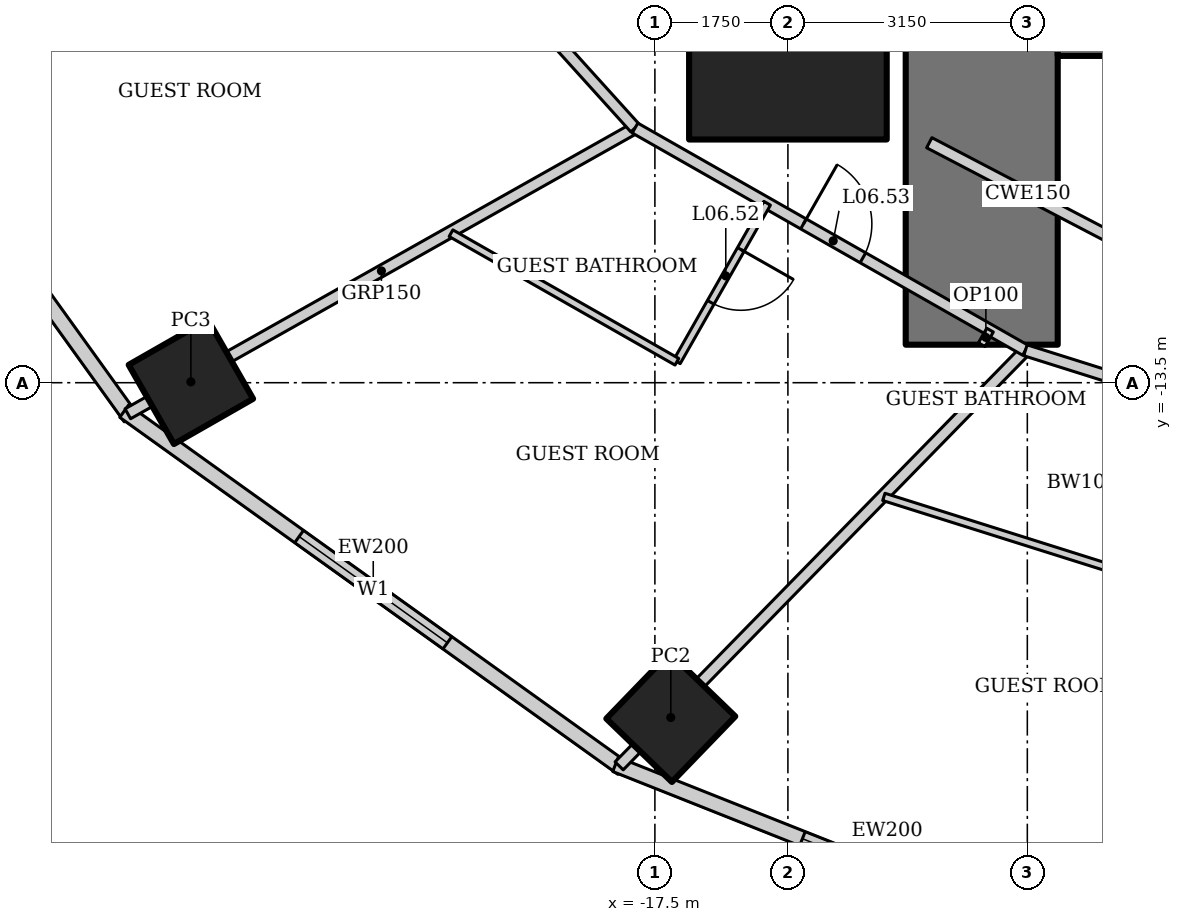
"""IFC4 building model, lengths in metres.
Left out: names, types, materials, properties, quantities, classifications, styles, units other than length and angle.
Written with IfcOpenShell. Run it as: python <this file> out.ifc"""

import sys

from ifc_helpers import new_model, si_unit, direction, frame, frame_2d, origin, origin_2d, place, context, subcontext, project, spatial, rectangle, hollow_rectangle, extrude, element, fill, save


model = new_model("IFC4")
c1 = context("Model", 3, precision=1e-05, world=origin(), true_north=direction((0.0, 1.0)))
c2 = subcontext(c1, "Body", "Model", "MODEL_VIEW")
j1 = project(units=[si_unit("LENGTHUNIT", "METRE"), si_unit("PLANEANGLEUNIT", "RADIAN")], contexts=[c1])
p1 = place(None, origin())
s1 = spatial("IfcSite", under=j1, at=p1, CompositionType="ELEMENT")
p2 = place(p1, origin())
s2 = spatial("IfcBuilding", under=s1, at=p2, CompositionType="ELEMENT")
p3 = place(p2, frame((0.0, 0.0, 37.0)))
s3 = spatial("IfcBuildingStorey", under=s2, at=p3, CompositionType="ELEMENT", Elevation=37.0)
p4 = place(p3, frame((-15.75, -9.0, 0.0), z_axis=(0.0, 0.0, 1.0), x_axis=(1.0, 0.0, 0.0)))
e1 = element("IfcColumn", 1, at=p4, inside=s3, PredefinedType="COLUMN", context=c2, shape_type="SweptSolid", body=[
    extrude(hollow_rectangle(XDim=2.6, YDim=2.6, WallThickness=0.13, at=origin_2d()), origin(), (0.0, 0.0, 1.0), 3.6),
])
p5 = place(p3, frame((-23.605, -13.489, 0.0), z_axis=(0.0, 0.0, 1.0), x_axis=(0.86824298017, 0.496139221777, 0.0)))
e2 = element("IfcColumn", 2, at=p5, inside=s3, PredefinedType="COLUMN", context=c2, shape_type="SweptSolid", body=[
    extrude(hollow_rectangle(XDim=1.2, YDim=1.2, WallThickness=0.12, at=origin_2d()), origin(), (0.0, 0.0, 1.0), 3.6),
])
p6 = place(p3, frame((-17.291, -17.905, 0.0), z_axis=(0.0, 0.0, 1.0), x_axis=(0.694658370459, 0.719339800339, 0.0)))
e3 = element("IfcColumn", 3, at=p6, inside=s3, PredefinedType="COLUMN", context=c2, shape_type="SweptSolid", body=[
    extrude(hollow_rectangle(XDim=1.2, YDim=1.2, WallThickness=0.1, at=origin_2d()), origin(), (0.0, 0.0, 1.0), 3.6),
])
p7 = place(p3, frame((-13.2, 13.0, 0.0), z_axis=(0.0, 0.0, 1.0), x_axis=(0.0, -1.0, 0.0)))
e4 = element("IfcWall", 4, at=p7, inside=s3, PredefinedType="SHEAR", context=c2, shape_type="SweptSolid", body=[
    extrude(rectangle(XDim=26.0, YDim=2.0, at=frame_2d((13.0, 0.0))), origin(), (0.0, 0.0, 1.0), 3.6),
])
p8 = place(p7, frame((12.1, 0.0, 0.0)))
e5 = element("IfcOpeningElement", 5, at=p8, cuts=e4, PredefinedType="OPENING", context=c2, shape_type="SweptSolid", body=[
    extrude(rectangle(XDim=1.8, YDim=2.1, at=frame_2d((0.9, 1.05))), frame((0.0, 1.01, 0.0), z_axis=(0.0, -1.0, 0.0), x_axis=(1.0, 0.0, 0.0)), (0.0, 0.0, 1.0), 2.02),
])
p9 = place(p3, frame((-12.2, -8.0, 0.0), z_axis=(0.0, 0.0, 1.0), x_axis=(1.0, 0.0, 0.0)))
e6 = element("IfcWall", 6, at=p9, inside=s3, PredefinedType="SHEAR", context=c2, shape_type="SweptSolid", body=[
    extrude(rectangle(XDim=24.4, YDim=2.4, at=frame_2d((12.2, 0.0))), origin(), (0.0, 0.0, 1.0), 3.6),
])
p10 = place(p3, frame((-29.26, -7.2, 0.0), z_axis=(0.0, 0.0, 1.0), x_axis=(0.583937613703, -0.811798536155, 0.0)))
e7 = element("IfcWall", 7, at=p10, inside=s3, PredefinedType="SOLIDWALL", context=c2, shape_type="SweptSolid", body=[
    extrude(rectangle(XDim=8.323, YDim=0.2, at=frame_2d((4.162, 0.0))), origin(), (0.0, 0.0, 1.0), 3.45),
])
p11 = place(p10, frame((2.961, 0.0, 0.5)))
e8 = element("IfcOpeningElement", 8, at=p11, cuts=e7, PredefinedType="OPENING", context=c2, shape_type="SweptSolid", body=[
    extrude(rectangle(XDim=2.4, YDim=2.2, at=frame_2d((1.2, 1.1))), frame((0.0, 0.11, 0.0), z_axis=(0.0, -1.0, 0.0), x_axis=(1.0, 0.0, 0.0)), (0.0, 0.0, 1.0), 0.22),
])
p12 = place(p3, frame((-24.482, -13.875, 0.0), z_axis=(0.0, 0.0, 1.0), x_axis=(0.812791321576, -0.582554948112, 0.0)))
e9 = element("IfcWall", 9, at=p12, inside=s3, PredefinedType="SOLIDWALL", context=c2, shape_type="SweptSolid", body=[
    extrude(rectangle(XDim=8.063, YDim=0.2, at=frame_2d((4.032, 0.0))), origin(), (0.0, 0.0, 1.0), 3.45),
])
p13 = place(p12, frame((2.832, 0.0, 0.5)))
e10 = element("IfcOpeningElement", 10, at=p13, cuts=e9, PredefinedType="OPENING", context=c2, shape_type="SweptSolid", body=[
    extrude(rectangle(XDim=2.4, YDim=2.2, at=frame_2d((1.2, 1.1))), frame((0.0, 0.11, 0.0), z_axis=(0.0, -1.0, 0.0), x_axis=(1.0, 0.0, 0.0)), (0.0, 0.0, 1.0), 0.22),
])
p14 = place(p3, frame((-18.018, -18.523, 0.0), z_axis=(0.0, 0.0, 1.0), x_axis=(0.929358351251, -0.369178892895, 0.0)))
e11 = element("IfcWall", 11, at=p14, inside=s3, PredefinedType="SOLIDWALL", context=c2, shape_type="SweptSolid", body=[
    extrude(rectangle(XDim=7.692, YDim=0.2, at=frame_2d((3.846, 0.0))), origin(), (0.0, 0.0, 1.0), 3.45),
])
p15 = place(p14, frame((2.646, 0.0, 0.5)))
e12 = element("IfcOpeningElement", 12, at=p15, cuts=e11, PredefinedType="OPENING", context=c2, shape_type="SweptSolid", body=[
    extrude(rectangle(XDim=2.4, YDim=2.2, at=frame_2d((1.2, 1.1))), frame((0.0, 0.11, 0.0), z_axis=(0.0, -1.0, 0.0), x_axis=(1.0, 0.0, 0.0)), (0.0, 0.0, 1.0), 0.22),
])
p16 = place(p3, frame((-24.435, -13.909, 0.0), z_axis=(0.0, 0.0, 1.0), x_axis=(0.871267209855, 0.490808974074, 0.0)))
e13 = element("IfcWall", 13, at=p16, inside=s3, PredefinedType="PARTITIONING", context=c2, shape_type="SweptSolid", body=[
    extrude(rectangle(XDim=7.659, YDim=0.15, at=frame_2d((3.83, 0.0))), origin(), (0.0, 0.0, 1.0), 2.693),
])
p17 = place(p3, frame((-17.97, -18.542, 0.0), z_axis=(0.0, 0.0, 1.0), x_axis=(0.699032031211, 0.715090357467, 0.0)))
e14 = element("IfcWall", 14, at=p17, inside=s3, PredefinedType="PARTITIONING", context=c2, shape_type="SweptSolid", body=[
    extrude(rectangle(XDim=7.647, YDim=0.15, at=frame_2d((3.824, 0.0))), origin(), (0.0, 0.0, 1.0), 2.528),
])
p18 = place(p3, frame((-21.982, -5.481, 0.0), z_axis=(0.0, 0.0, 1.0), x_axis=(0.670598380282, -0.741820606591, 0.0)))
e15 = element("IfcWall", 15, at=p18, inside=s3, PredefinedType="PARTITIONING", context=c2, shape_type="SweptSolid", body=[
    extrude(rectangle(XDim=6.293, YDim=0.15, at=frame_2d((3.147, 0.0))), origin(), (0.0, 0.0, 1.0), 3.45),
])
p19 = place(p18, frame((2.1, 0.0, 0.0)))
e16 = element("IfcOpeningElement", 16, at=p19, cuts=e15, PredefinedType="OPENING", context=c2, shape_type="SweptSolid", body=[
    extrude(rectangle(XDim=0.9, YDim=2.1, at=frame_2d((0.45, 1.05))), frame((0.0, 0.085, 0.0), z_axis=(0.0, -1.0, 0.0), x_axis=(1.0, 0.0, 0.0)), (0.0, 0.0, 1.0), 0.17),
])
p20 = place(p3, frame((-17.761, -10.149, 0.0), z_axis=(0.0, 0.0, 1.0), x_axis=(0.86907565943, -0.494679187136, 0.0)))
e17 = element("IfcWall", 17, at=p20, inside=s3, PredefinedType="PARTITIONING", context=c2, shape_type="SweptSolid", body=[
    extrude(rectangle(XDim=5.911, YDim=0.15, at=frame_2d((2.955, 0.0))), origin(), (0.0, 0.0, 1.0), 3.45),
])
p21 = place(p20, frame((2.55, 0.0, 0.0)))
e18 = element("IfcOpeningElement", 18, at=p21, cuts=e17, PredefinedType="OPENING", context=c2, shape_type="SweptSolid", body=[
    extrude(rectangle(XDim=0.9, YDim=2.1, at=frame_2d((0.45, 1.05))), frame((0.0, 0.085, 0.0), z_axis=(0.0, -1.0, 0.0), x_axis=(1.0, 0.0, 0.0)), (0.0, 0.0, 1.0), 0.17),
])
p22 = place(p3, frame((-12.625, -13.073, 0.0), z_axis=(0.0, 0.0, 1.0), x_axis=(0.953774229808, -0.30052407317, 0.0)))
e19 = element("IfcWall", 19, at=p22, inside=s3, PredefinedType="PARTITIONING", context=c2, shape_type="SweptSolid", body=[
    extrude(rectangle(XDim=5.388, YDim=0.15, at=frame_2d((2.694, 0.0))), origin(), (0.0, 0.0, 1.0), 3.45),
])
p23 = place(p22, frame((4.338, 0.0, 0.0)))
e20 = element("IfcOpeningElement", 20, at=p23, cuts=e19, PredefinedType="OPENING", context=c2, shape_type="SweptSolid", body=[
    extrude(rectangle(XDim=0.9, YDim=2.1, at=frame_2d((0.45, 1.05))), frame((0.0, 0.085, 0.0), z_axis=(0.0, -1.0, 0.0), x_axis=(1.0, 0.0, 0.0)), (0.0, 0.0, 1.0), 0.17),
])
p24 = place(p3, frame((-16.023, -11.139, 0.0), z_axis=(0.0, 0.0, 1.0), x_axis=(-0.494659381266, -0.869086932663, 0.0)))
e21 = element("IfcWall", 21, at=p24, inside=s3, PredefinedType="PARTITIONING", context=c2, shape_type="SweptSolid", body=[
    extrude(rectangle(XDim=2.4, YDim=0.1, at=frame_2d((1.2, 0.0))), origin(), (0.0, 0.0, 1.0), 3.45),
])
p25 = place(p24, frame((0.7, 0.0, 0.0)))
e22 = element("IfcOpeningElement", 22, at=p25, cuts=e21, PredefinedType="OPENING", context=c2, shape_type="SweptSolid", body=[
    extrude(rectangle(XDim=0.8, YDim=2.1, at=frame_2d((0.4, 1.05))), frame((0.0, 0.06, 0.0), z_axis=(0.0, -1.0, 0.0), x_axis=(1.0, 0.0, 0.0)), (0.0, 0.0, 1.0), 0.12),
])
p26 = place(p3, frame((-17.21, -13.225, 0.0), z_axis=(0.0, 0.0, 1.0), x_axis=(-0.869041592831, 0.494739032147, 0.0)))
e23 = element("IfcWall", 23, at=p26, inside=s3, PredefinedType="PARTITIONING", context=c2, shape_type="SweptSolid", body=[
    extrude(rectangle(XDim=3.42, YDim=0.1, at=frame_2d((1.71, 0.0))), origin(), (0.0, 0.0, 1.0), 3.45),
])
p27 = place(p3, frame((-11.438, -15.963, 0.0), z_axis=(0.0, 0.0, 1.0), x_axis=(-0.953784420519, 0.300491728963, 0.0)))
e24 = element("IfcWall", 24, at=p27, inside=s3, PredefinedType="PARTITIONING", context=c2, shape_type="SweptSolid", body=[
    extrude(rectangle(XDim=3.197, YDim=0.1, at=frame_2d((1.599, 0.0))), origin(), (0.0, 0.0, 1.0), 3.45),
])
p28 = place(p3, frame((-13.2, -13.0, 0.0), z_axis=(0.0, 0.0, 1.0), x_axis=(0.49435138335, 0.869262164011, 0.0)))
e25 = element("IfcWall", 25, at=p28, inside=s3, PredefinedType="PARTITIONING", context=c2, shape_type="SweptSolid", body=[
    extrude(rectangle(XDim=0.221, YDim=0.1, at=frame_2d((0.11, 0.0))), origin(), (0.0, 0.0, 1.0), 3.45),
])
p29 = place(p3, frame((-13.89, -10.342, 0.0), z_axis=(0.0, 0.0, 1.0), x_axis=(0.886275255135, -0.463158905922, 0.0)))
e26 = element("IfcWall", 26, at=p29, inside=s3, PredefinedType="PARTITIONING", context=c2, shape_type="SweptSolid", body=[
    extrude(rectangle(XDim=2.927, YDim=0.15, at=frame_2d((1.463, 0.0))), origin(), (0.0, 0.0, 1.0), 3.45),
])
p30 = place(p13, origin())
e27 = element("IfcWindow", 27, at=p30, inside=s3, PartitioningType="SINGLE_PANEL", PredefinedType="WINDOW", context=c2, shape_type="SweptSolid", body=[
    extrude(rectangle(XDim=2.4, YDim=2.2, at=frame_2d((1.2, 1.1))), frame((0.0, 0.03, 0.0), z_axis=(0.0, -1.0, 0.0), x_axis=(1.0, 0.0, 0.0)), (0.0, 0.0, 1.0), 0.06),
])
fill(e10, e27)
p31 = place(p15, origin())
e28 = element("IfcWindow", 28, at=p31, inside=s3, PartitioningType="SINGLE_PANEL", PredefinedType="WINDOW", context=c2, shape_type="SweptSolid", body=[
    extrude(rectangle(XDim=2.4, YDim=2.2, at=frame_2d((1.2, 1.1))), frame((0.0, 0.03, 0.0), z_axis=(0.0, -1.0, 0.0), x_axis=(1.0, 0.0, 0.0)), (0.0, 0.0, 1.0), 0.06),
])
fill(e12, e28)
p32 = place(p25, origin())
e29 = element("IfcDoor", 29, at=p32, inside=s3, OperationType="SINGLE_SWING_LEFT", PredefinedType="DOOR", context=c2, shape_type="SweptSolid", body=[
    extrude(rectangle(XDim=0.8, YDim=2.1, at=frame_2d((0.4, 1.05))), frame((0.0, 0.025, 0.0), z_axis=(0.0, -1.0, 0.0), x_axis=(1.0, 0.0, 0.0)), (0.0, 0.0, 1.0), 0.05),
])
fill(e22, e29)
p33 = place(p21, origin())
e30 = element("IfcDoor", 30, at=p33, inside=s3, OperationType="SINGLE_SWING_LEFT", PredefinedType="DOOR", context=c2, shape_type="SweptSolid", body=[
    extrude(rectangle(XDim=0.9, YDim=2.1, at=frame_2d((0.45, 1.05))), frame((0.0, 0.025, 0.0), z_axis=(0.0, -1.0, 0.0), x_axis=(1.0, 0.0, 0.0)), (0.0, 0.0, 1.0), 0.05),
])
fill(e18, e30)
save(model, sys.argv[1])
